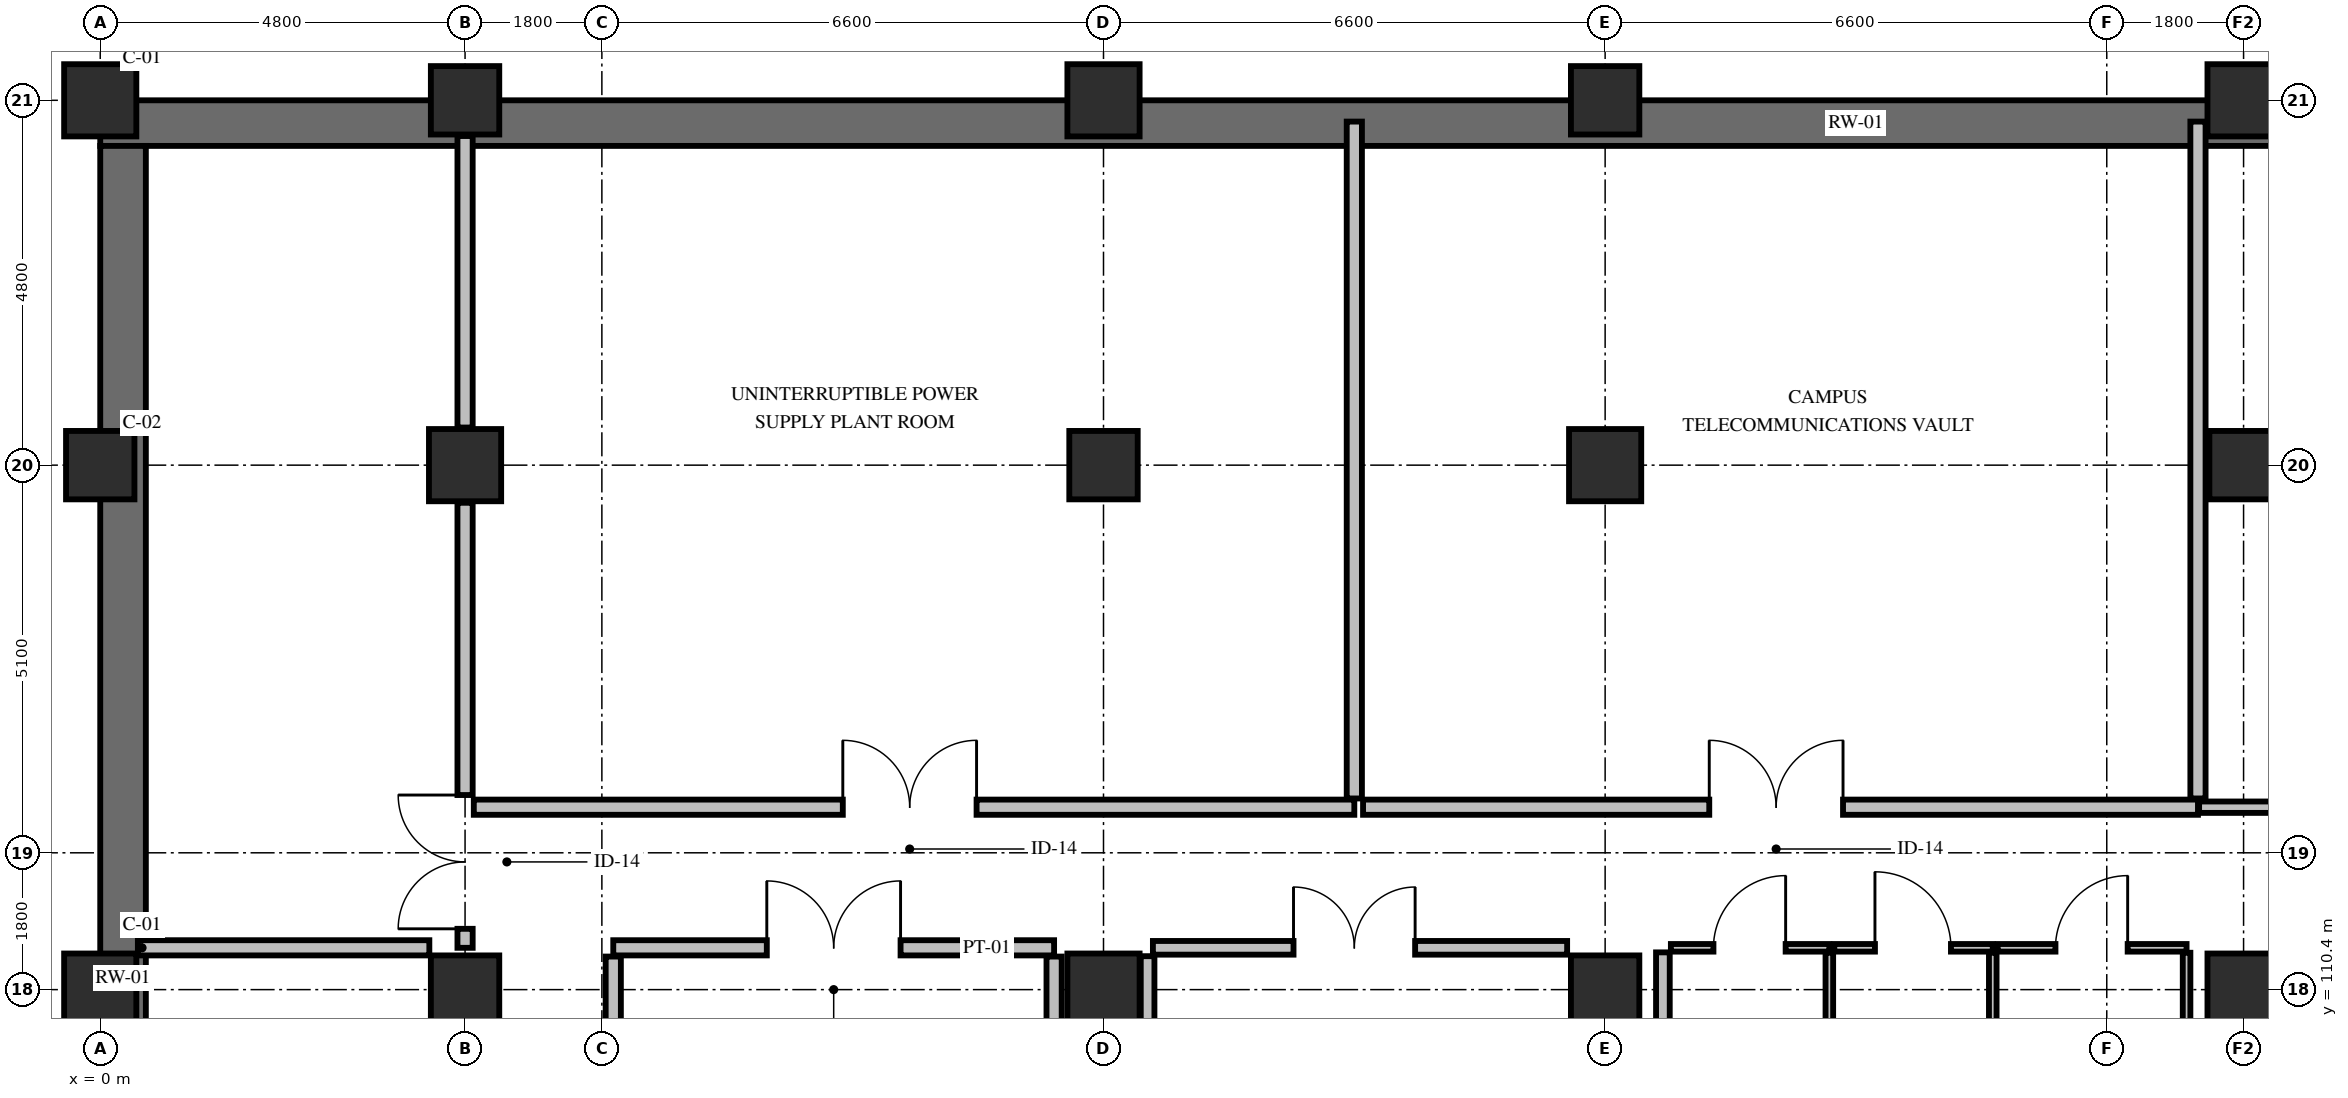
"""IFC4 building model, lengths in metres.
Left out: names, types, materials, properties, quantities, classifications, styles, units other than length and angle.
Written with IfcOpenShell. Run it as: python <this file> out.ifc"""

import sys

from ifc_helpers import new_model, si_unit, direction, frame, frame_2d, origin, origin_2d, place, context, subcontext, project, spatial, rectangle, extrude, element, fill, save


model = new_model("IFC4")
c1 = context("Model", 3, precision=1e-05, world=origin(), true_north=direction((0.0, 1.0)))
c2 = subcontext(c1, "Body", "Model", "MODEL_VIEW")
j1 = project(units=[si_unit("LENGTHUNIT", "METRE"), si_unit("PLANEANGLEUNIT", "RADIAN")], contexts=[c1])
p1 = place(None, origin())
s1 = spatial("IfcSite", under=j1, at=p1, CompositionType="ELEMENT")
p2 = place(p1, origin())
s2 = spatial("IfcBuilding", under=s1, at=p2, CompositionType="ELEMENT")
p3 = place(p2, frame((0.0, 0.0, -5.4)))
s3 = spatial("IfcBuildingStorey", under=s2, at=p3, CompositionType="ELEMENT", Elevation=-5.4)
p4 = place(p3, frame((0.0, 121.8, 0.0), z_axis=(0.0, 0.0, 1.0), x_axis=(1.0, 0.0, 0.0)))
e1 = element("IfcWall", 1, at=p4, inside=s3, PredefinedType="USERDEFINED", context=c2, shape_type="SweptSolid", body=[
    extrude(rectangle(XDim=46.2, YDim=0.6, at=frame_2d((23.1, 0.0))), origin(), (0.0, 0.0, 1.0), 4.96),
])
p5 = place(p3, frame((0.3, 99.6, 0.0), z_axis=(0.0, 0.0, 1.0), x_axis=(0.0, 1.0, 0.0)))
e2 = element("IfcWall", 2, at=p5, inside=s3, PredefinedType="USERDEFINED", context=c2, shape_type="SweptSolid", body=[
    extrude(rectangle(XDim=21.9, YDim=0.6, at=frame_2d((10.95, 0.0))), origin(), (0.0, 0.0, 1.0), 4.96),
])
p6 = place(p3, frame((0.0, 110.4, 0.0), z_axis=(0.0, 0.0, 1.0), x_axis=(1.0, 0.0, 0.0)))
e3 = element("IfcColumn", 3, at=p6, inside=s3, PredefinedType="COLUMN", context=c2, shape_type="SweptSolid", body=[
    extrude(rectangle(XDim=0.95, YDim=0.95, at=origin_2d()), origin(), (0.0, 0.0, 1.0), 5.4),
])
p7 = place(p3, frame((0.0, 117.3, 0.0), z_axis=(0.0, 0.0, 1.0), x_axis=(1.0, 0.0, 0.0)))
e4 = element("IfcColumn", 4, at=p7, inside=s3, PredefinedType="COLUMN", context=c2, shape_type="SweptSolid", body=[
    extrude(rectangle(XDim=0.9, YDim=0.9, at=origin_2d()), origin(), (0.0, 0.0, 1.0), 5.4),
])
p8 = place(p3, frame((0.0, 122.1, 0.0), z_axis=(0.0, 0.0, 1.0), x_axis=(1.0, 0.0, 0.0)))
e5 = element("IfcColumn", 5, at=p8, inside=s3, PredefinedType="COLUMN", context=c2, shape_type="SweptSolid", body=[
    extrude(rectangle(XDim=0.95, YDim=0.95, at=origin_2d()), origin(), (0.0, 0.0, 1.0), 5.4),
])
p9 = place(p3, frame((4.8, 110.4, 0.0), z_axis=(0.0, 0.0, 1.0), x_axis=(1.0, 0.0, 0.0)))
e6 = element("IfcColumn", 6, at=p9, inside=s3, PredefinedType="COLUMN", context=c2, shape_type="SweptSolid", body=[
    extrude(rectangle(XDim=0.9, YDim=0.9, at=origin_2d()), origin(), (0.0, 0.0, 1.0), 5.4),
])
p10 = place(p3, frame((4.8, 117.3, 0.0), z_axis=(0.0, 0.0, 1.0), x_axis=(1.0, 0.0, 0.0)))
e7 = element("IfcColumn", 7, at=p10, inside=s3, PredefinedType="COLUMN", context=c2, shape_type="SweptSolid", body=[
    extrude(rectangle(XDim=0.95, YDim=0.95, at=origin_2d()), origin(), (0.0, 0.0, 1.0), 5.4),
])
p11 = place(p3, frame((4.8, 122.1, 0.0), z_axis=(0.0, 0.0, 1.0), x_axis=(1.0, 0.0, 0.0)))
e8 = element("IfcColumn", 8, at=p11, inside=s3, PredefinedType="COLUMN", context=c2, shape_type="SweptSolid", body=[
    extrude(rectangle(XDim=0.9, YDim=0.9, at=origin_2d()), origin(), (0.0, 0.0, 1.0), 5.4),
])
p12 = place(p3, frame((13.2, 110.4, 0.0), z_axis=(0.0, 0.0, 1.0), x_axis=(1.0, 0.0, 0.0)))
e9 = element("IfcColumn", 9, at=p12, inside=s3, PredefinedType="COLUMN", context=c2, shape_type="SweptSolid", body=[
    extrude(rectangle(XDim=0.95, YDim=0.95, at=origin_2d()), origin(), (0.0, 0.0, 1.0), 5.4),
])
p13 = place(p3, frame((13.2, 117.3, 0.0), z_axis=(0.0, 0.0, 1.0), x_axis=(1.0, 0.0, 0.0)))
e10 = element("IfcColumn", 10, at=p13, inside=s3, PredefinedType="COLUMN", context=c2, shape_type="SweptSolid", body=[
    extrude(rectangle(XDim=0.9, YDim=0.9, at=origin_2d()), origin(), (0.0, 0.0, 1.0), 5.4),
])
p14 = place(p3, frame((13.2, 122.1, 0.0), z_axis=(0.0, 0.0, 1.0), x_axis=(1.0, 0.0, 0.0)))
e11 = element("IfcColumn", 11, at=p14, inside=s3, PredefinedType="COLUMN", context=c2, shape_type="SweptSolid", body=[
    extrude(rectangle(XDim=0.95, YDim=0.95, at=origin_2d()), origin(), (0.0, 0.0, 1.0), 5.4),
])
p15 = place(p3, frame((19.8, 110.4, 0.0), z_axis=(0.0, 0.0, 1.0), x_axis=(1.0, 0.0, 0.0)))
e12 = element("IfcColumn", 12, at=p15, inside=s3, PredefinedType="COLUMN", context=c2, shape_type="SweptSolid", body=[
    extrude(rectangle(XDim=0.9, YDim=0.9, at=origin_2d()), origin(), (0.0, 0.0, 1.0), 5.4),
])
p16 = place(p3, frame((19.8, 117.3, 0.0), z_axis=(0.0, 0.0, 1.0), x_axis=(1.0, 0.0, 0.0)))
e13 = element("IfcColumn", 13, at=p16, inside=s3, PredefinedType="COLUMN", context=c2, shape_type="SweptSolid", body=[
    extrude(rectangle(XDim=0.95, YDim=0.95, at=origin_2d()), origin(), (0.0, 0.0, 1.0), 5.4),
])
p17 = place(p3, frame((19.8, 122.1, 0.0), z_axis=(0.0, 0.0, 1.0), x_axis=(1.0, 0.0, 0.0)))
e14 = element("IfcColumn", 14, at=p17, inside=s3, PredefinedType="COLUMN", context=c2, shape_type="SweptSolid", body=[
    extrude(rectangle(XDim=0.9, YDim=0.9, at=origin_2d()), origin(), (0.0, 0.0, 1.0), 5.4),
])
p18 = place(p3, frame((28.2, 110.4, 0.0), z_axis=(0.0, 0.0, 1.0), x_axis=(1.0, 0.0, 0.0)))
e15 = element("IfcColumn", 15, at=p18, inside=s3, PredefinedType="COLUMN", context=c2, shape_type="SweptSolid", body=[
    extrude(rectangle(XDim=0.95, YDim=0.95, at=origin_2d()), origin(), (0.0, 0.0, 1.0), 5.4),
])
p19 = place(p3, frame((28.2, 117.3, 0.0), z_axis=(0.0, 0.0, 1.0), x_axis=(1.0, 0.0, 0.0)))
e16 = element("IfcColumn", 16, at=p19, inside=s3, PredefinedType="COLUMN", context=c2, shape_type="SweptSolid", body=[
    extrude(rectangle(XDim=0.9, YDim=0.9, at=origin_2d()), origin(), (0.0, 0.0, 1.0), 5.4),
])
p20 = place(p3, frame((28.2, 122.1, 0.0), z_axis=(0.0, 0.0, 1.0), x_axis=(1.0, 0.0, 0.0)))
e17 = element("IfcColumn", 17, at=p20, inside=s3, PredefinedType="COLUMN", context=c2, shape_type="SweptSolid", body=[
    extrude(rectangle(XDim=0.95, YDim=0.95, at=origin_2d()), origin(), (0.0, 0.0, 1.0), 5.4),
])
p21 = place(p3, frame((13.85, 110.95, 0.0), z_axis=(0.0, 0.0, 1.0), x_axis=(1.0, 0.0, 0.0)))
e18 = element("IfcWall", 18, at=p21, inside=s3, PredefinedType="PARTITIONING", context=c2, shape_type="SweptSolid", body=[
    extrude(rectangle(XDim=5.45, YDim=0.18, at=frame_2d((2.725, 0.0))), origin(), (0.0, 0.0, 1.0), 4.895),
])
p22 = place(p21, frame((1.85, 0.0, 0.0)))
e19 = element("IfcOpeningElement", 19, at=p22, cuts=e18, PredefinedType="OPENING", context=c2, shape_type="SweptSolid", body=[
    extrude(rectangle(XDim=1.6, YDim=2.25, at=frame_2d((0.8, 1.125))), frame((0.0, 0.105, 0.0), z_axis=(0.0, -1.0, 0.0), x_axis=(1.0, 0.0, 0.0)), (0.0, 0.0, 1.0), 0.21),
])
p23 = place(p3, frame((13.78, 107.23, 0.0), z_axis=(0.0, 0.0, 1.0), x_axis=(0.0, 1.0, 0.0)))
e20 = element("IfcWall", 20, at=p23, inside=s3, PredefinedType="PARTITIONING", context=c2, shape_type="SweptSolid", body=[
    extrude(rectangle(XDim=3.61, YDim=0.18, at=frame_2d((1.805, 0.0))), origin(), (0.0, 0.0, 1.0), 4.73),
])
p24 = place(p3, frame((20.56, 107.98, 0.0), z_axis=(0.0, 0.0, 1.0), x_axis=(0.0, 1.0, 0.0)))
e21 = element("IfcWall", 21, at=p24, inside=s3, PredefinedType="PARTITIONING", context=c2, shape_type="SweptSolid", body=[
    extrude(rectangle(XDim=2.91, YDim=0.18, at=frame_2d((1.455, 0.0))), origin(), (0.0, 0.0, 1.0), 4.43),
])
p25 = place(p3, frame((20.665, 110.95, 0.0), z_axis=(0.0, 0.0, 1.0), x_axis=(1.0, 0.0, 0.0)))
e22 = element("IfcWall", 22, at=p25, inside=s3, PredefinedType="PARTITIONING", context=c2, shape_type="SweptSolid", body=[
    extrude(rectangle(XDim=2.085, YDim=0.1, at=frame_2d((1.042, 0.0))), origin(), (0.0, 0.0, 1.0), 4.895),
])
p26 = place(p25, frame((0.56, 0.0, 0.0)))
e23 = element("IfcOpeningElement", 23, at=p26, cuts=e22, PredefinedType="OPENING", context=c2, shape_type="SweptSolid", body=[
    extrude(rectangle(XDim=0.95, YDim=2.15, at=frame_2d((0.475, 1.075))), frame((0.0, 0.065, 0.0), z_axis=(0.0, -1.0, 0.0), x_axis=(1.0, 0.0, 0.0)), (0.0, 0.0, 1.0), 0.13),
])
p27 = place(p3, frame((22.75, 107.98, 0.0), z_axis=(0.0, 0.0, 1.0), x_axis=(0.0, 1.0, 0.0)))
e24 = element("IfcWall", 24, at=p27, inside=s3, PredefinedType="PARTITIONING", context=c2, shape_type="SweptSolid", body=[
    extrude(rectangle(XDim=2.905, YDim=0.1, at=frame_2d((1.453, 0.0))), origin(), (0.0, 0.0, 1.0), 4.43),
])
p28 = place(p3, frame((22.815, 110.95, 0.0), z_axis=(0.0, 0.0, 1.0), x_axis=(1.0, 0.0, 0.0)))
e25 = element("IfcWall", 25, at=p28, inside=s3, PredefinedType="PARTITIONING", context=c2, shape_type="SweptSolid", body=[
    extrude(rectangle(XDim=2.085, YDim=0.1, at=frame_2d((1.042, 0.0))), origin(), (0.0, 0.0, 1.0), 4.96),
])
p29 = place(p28, frame((0.535, 0.0, 0.0)))
e26 = element("IfcOpeningElement", 26, at=p29, cuts=e25, PredefinedType="OPENING", context=c2, shape_type="SweptSolid", body=[
    extrude(rectangle(XDim=1.0, YDim=2.15, at=frame_2d((0.5, 1.075))), frame((0.0, 0.065, 0.0), z_axis=(0.0, -1.0, 0.0), x_axis=(1.0, 0.0, 0.0)), (0.0, 0.0, 1.0), 0.13),
])
p30 = place(p3, frame((24.9, 107.98, 0.0), z_axis=(0.0, 0.0, 1.0), x_axis=(0.0, 1.0, 0.0)))
e27 = element("IfcWall", 27, at=p30, inside=s3, PredefinedType="PARTITIONING", context=c2, shape_type="SweptSolid", body=[
    extrude(rectangle(XDim=2.905, YDim=0.1, at=frame_2d((1.453, 0.0))), origin(), (0.0, 0.0, 1.0), 4.43),
])
p31 = place(p3, frame((24.965, 110.95, 0.0), z_axis=(0.0, 0.0, 1.0), x_axis=(1.0, 0.0, 0.0)))
e28 = element("IfcWall", 28, at=p31, inside=s3, PredefinedType="PARTITIONING", context=c2, shape_type="SweptSolid", body=[
    extrude(rectangle(XDim=2.485, YDim=0.1, at=frame_2d((1.242, 0.0))), origin(), (0.0, 0.0, 1.0), 4.895),
])
p32 = place(p31, frame((0.76, 0.0, 0.0)))
e29 = element("IfcOpeningElement", 29, at=p32, cuts=e28, PredefinedType="OPENING", context=c2, shape_type="SweptSolid", body=[
    extrude(rectangle(XDim=0.95, YDim=2.15, at=frame_2d((0.475, 1.075))), frame((0.0, 0.065, 0.0), z_axis=(0.0, -1.0, 0.0), x_axis=(1.0, 0.0, 0.0)), (0.0, 0.0, 1.0), 0.13),
])
p33 = place(p3, frame((27.45, 107.98, 0.0), z_axis=(0.0, 0.0, 1.0), x_axis=(0.0, 1.0, 0.0)))
e30 = element("IfcWall", 30, at=p33, inside=s3, PredefinedType="PARTITIONING", context=c2, shape_type="SweptSolid", body=[
    extrude(rectangle(XDim=2.905, YDim=0.1, at=frame_2d((1.453, 0.0))), origin(), (0.0, 0.0, 1.0), 4.43),
])
p34 = place(p3, frame((6.75, 110.95, 0.0), z_axis=(0.0, 0.0, 1.0), x_axis=(1.0, 0.0, 0.0)))
e31 = element("IfcWall", 31, at=p34, inside=s3, PredefinedType="PARTITIONING", context=c2, shape_type="SweptSolid", body=[
    extrude(rectangle(XDim=5.8, YDim=0.2, at=frame_2d((2.9, 0.0))), origin(), (0.0, 0.0, 1.0), 4.895),
])
p35 = place(p34, frame((2.02, 0.0, 0.0)))
e32 = element("IfcOpeningElement", 32, at=p35, cuts=e31, PredefinedType="OPENING", context=c2, shape_type="SweptSolid", body=[
    extrude(rectangle(XDim=1.76, YDim=2.35, at=frame_2d((0.88, 1.175))), frame((0.0, 0.115, 0.0), z_axis=(0.0, -1.0, 0.0), x_axis=(1.0, 0.0, 0.0)), (0.0, 0.0, 1.0), 0.23),
])
for number, where, z_axis, x_axis in (
    (33, (6.75, 104.615, 0.0), (0.0, 0.0, 1.0), (0.0, 1.0, 0.0)),
    (34, (12.55, 104.615, 0.0), (0.0, 0.0, 1.0), (0.0, 1.0, 0.0)),
):
    element("IfcWall", number, at=place(p3, frame(where, z_axis=z_axis, x_axis=x_axis)), inside=s3, PredefinedType="PARTITIONING", context=c2, shape_type="SweptSolid", body=[
        extrude(rectangle(XDim=6.22, YDim=0.2, at=frame_2d((3.11, 0.0))), origin(), (0.0, 0.0, 1.0), 4.43),
    ])
p36 = place(p3, frame((0.495, 110.95, 0.0), z_axis=(0.0, 0.0, 1.0), x_axis=(1.0, 0.0, 0.0)))
e35 = element("IfcWall", 35, at=p36, inside=s3, PredefinedType="PARTITIONING", context=c2, shape_type="SweptSolid", body=[
    extrude(rectangle(XDim=3.835, YDim=0.2, at=frame_2d((1.917, 0.0))), origin(), (0.0, 0.0, 1.0), 4.895),
])
p37 = place(p3, frame((4.8, 110.95, 0.0), z_axis=(0.0, 0.0, 1.0), x_axis=(0.0, 1.0, 0.0)))
e36 = element("IfcWall", 36, at=p37, inside=s3, PredefinedType="PARTITIONING", context=c2, shape_type="SweptSolid", body=[
    extrude(rectangle(XDim=5.855, YDim=0.2, at=frame_2d((2.927, 0.0))), origin(), (0.0, 0.0, 1.0), 4.73),
])
p38 = place(p37, frame((0.25, 0.0, 0.0)))
e37 = element("IfcOpeningElement", 37, at=p38, cuts=e36, PredefinedType="OPENING", context=c2, shape_type="SweptSolid", body=[
    extrude(rectangle(XDim=1.76, YDim=2.35, at=frame_2d((0.88, 1.175))), frame((0.0, 0.115, 0.0), z_axis=(0.0, -1.0, 0.0), x_axis=(1.0, 0.0, 0.0)), (0.0, 0.0, 1.0), 0.23),
])
p39 = place(p3, frame((4.8, 117.795, 0.0), z_axis=(0.0, 0.0, 1.0), x_axis=(0.0, 1.0, 0.0)))
e38 = element("IfcWall", 38, at=p39, inside=s3, PredefinedType="PARTITIONING", context=c2, shape_type="SweptSolid", body=[
    extrude(rectangle(XDim=3.835, YDim=0.2, at=frame_2d((1.917, 0.0))), origin(), (0.0, 0.0, 1.0), 4.73),
])
p40 = place(p3, frame((4.915, 112.8, 0.0), z_axis=(0.0, 0.0, 1.0), x_axis=(1.0, 0.0, 0.0)))
e39 = element("IfcWall", 39, at=p40, inside=s3, PredefinedType="PARTITIONING", context=c2, shape_type="SweptSolid", body=[
    extrude(rectangle(XDim=11.585, YDim=0.2, at=frame_2d((5.792, 0.0))), origin(), (0.0, 0.0, 1.0), 4.73),
])
p41 = place(p40, frame((4.855, 0.0, 0.0)))
e40 = element("IfcOpeningElement", 40, at=p41, cuts=e39, PredefinedType="OPENING", context=c2, shape_type="SweptSolid", body=[
    extrude(rectangle(XDim=1.76, YDim=2.35, at=frame_2d((0.88, 1.175))), frame((0.0, 0.115, 0.0), z_axis=(0.0, -1.0, 0.0), x_axis=(1.0, 0.0, 0.0)), (0.0, 0.0, 1.0), 0.23),
])
p42 = place(p3, frame((16.5, 112.915, 0.0), z_axis=(0.0, 0.0, 1.0), x_axis=(0.0, 1.0, 0.0)))
e41 = element("IfcWall", 41, at=p42, inside=s3, PredefinedType="PARTITIONING", context=c2, shape_type="SweptSolid", body=[
    extrude(rectangle(XDim=8.905, YDim=0.2, at=frame_2d((4.453, 0.0))), origin(), (0.0, 0.0, 1.0), 4.73),
])
p43 = place(p3, frame((16.615, 112.8, 0.0), z_axis=(0.0, 0.0, 1.0), x_axis=(1.0, 0.0, 0.0)))
e42 = element("IfcWall", 42, at=p43, inside=s3, PredefinedType="PARTITIONING", context=c2, shape_type="SweptSolid", body=[
    extrude(rectangle(XDim=10.985, YDim=0.2, at=frame_2d((5.493, 0.0))), origin(), (0.0, 0.0, 1.0), 4.73),
])
p44 = place(p43, frame((4.555, 0.0, 0.0)))
e43 = element("IfcOpeningElement", 43, at=p44, cuts=e42, PredefinedType="OPENING", context=c2, shape_type="SweptSolid", body=[
    extrude(rectangle(XDim=1.76, YDim=2.35, at=frame_2d((0.88, 1.175))), frame((0.0, 0.115, 0.0), z_axis=(0.0, -1.0, 0.0), x_axis=(1.0, 0.0, 0.0)), (0.0, 0.0, 1.0), 0.23),
])
p45 = place(p3, frame((27.6, 112.915, 0.0), z_axis=(0.0, 0.0, 1.0), x_axis=(0.0, 1.0, 0.0)))
e44 = element("IfcWall", 44, at=p45, inside=s3, PredefinedType="PARTITIONING", context=c2, shape_type="SweptSolid", body=[
    extrude(rectangle(XDim=8.905, YDim=0.2, at=frame_2d((4.453, 0.0))), origin(), (0.0, 0.0, 1.0), 4.43),
])
p46 = place(p3, frame((27.615, 112.8, 0.0), z_axis=(0.0, 0.0, 1.0), x_axis=(1.0, 0.0, 0.0)))
e45 = element("IfcWall", 45, at=p46, inside=s3, PredefinedType="PARTITIONING", context=c2, shape_type="SweptSolid", body=[
    extrude(rectangle(XDim=18.305, YDim=0.15, at=frame_2d((9.152, 0.0))), origin(), (0.0, 0.0, 1.0), 4.73),
])
p47 = place(p46, frame((8.475, 0.0, 0.0)))
e46 = element("IfcOpeningElement", 46, at=p47, cuts=e45, PredefinedType="OPENING", context=c2, shape_type="SweptSolid", body=[
    extrude(rectangle(XDim=1.34, YDim=2.2, at=frame_2d((0.67, 1.1))), frame((0.0, 0.09, 0.0), z_axis=(0.0, -1.0, 0.0), x_axis=(1.0, 0.0, 0.0)), (0.0, 0.0, 1.0), 0.18),
])
p48 = place(p22, origin())
e47 = element("IfcDoor", 47, at=p48, inside=s3, OperationType="DOUBLE_DOOR_SINGLE_SWING", PredefinedType="DOOR", context=c2, shape_type="SweptSolid", body=[
    extrude(rectangle(XDim=1.6, YDim=2.25, at=frame_2d((0.8, 1.125))), frame((0.0, 0.025, 0.0), z_axis=(0.0, -1.0, 0.0), x_axis=(1.0, 0.0, 0.0)), (0.0, 0.0, 1.0), 0.05),
])
fill(e19, e47)
p49 = place(p26, origin())
e48 = element("IfcDoor", 48, at=p49, inside=s3, OperationType="SINGLE_SWING_RIGHT", PredefinedType="DOOR", context=c2, shape_type="SweptSolid", body=[
    extrude(rectangle(XDim=0.95, YDim=2.15, at=frame_2d((0.475, 1.075))), frame((0.0, 0.025, 0.0), z_axis=(0.0, -1.0, 0.0), x_axis=(1.0, 0.0, 0.0)), (0.0, 0.0, 1.0), 0.05),
])
fill(e23, e48)
p50 = place(p29, origin())
e49 = element("IfcDoor", 49, at=p50, inside=s3, OperationType="SINGLE_SWING_LEFT", PredefinedType="DOOR", context=c2, shape_type="SweptSolid", body=[
    extrude(rectangle(XDim=1.0, YDim=2.15, at=frame_2d((0.5, 1.075))), frame((0.0, 0.025, 0.0), z_axis=(0.0, -1.0, 0.0), x_axis=(1.0, 0.0, 0.0)), (0.0, 0.0, 1.0), 0.05),
])
fill(e26, e49)
p51 = place(p32, origin())
e50 = element("IfcDoor", 50, at=p51, inside=s3, OperationType="SINGLE_SWING_RIGHT", PredefinedType="DOOR", context=c2, shape_type="SweptSolid", body=[
    extrude(rectangle(XDim=0.95, YDim=2.15, at=frame_2d((0.475, 1.075))), frame((0.0, 0.025, 0.0), z_axis=(0.0, -1.0, 0.0), x_axis=(1.0, 0.0, 0.0)), (0.0, 0.0, 1.0), 0.05),
])
fill(e29, e50)
p52 = place(p35, origin())
e51 = element("IfcDoor", 51, at=p52, inside=s3, OperationType="DOUBLE_DOOR_SINGLE_SWING", PredefinedType="DOOR", context=c2, shape_type="SweptSolid", body=[
    extrude(rectangle(XDim=1.76, YDim=2.35, at=frame_2d((0.88, 1.175))), frame((0.0, 0.025, 0.0), z_axis=(0.0, -1.0, 0.0), x_axis=(1.0, 0.0, 0.0)), (0.0, 0.0, 1.0), 0.05),
])
fill(e32, e51)
p53 = place(p38, origin())
e52 = element("IfcDoor", 52, at=p53, inside=s3, OperationType="DOUBLE_DOOR_SINGLE_SWING", PredefinedType="DOOR", context=c2, shape_type="SweptSolid", body=[
    extrude(rectangle(XDim=1.76, YDim=2.35, at=frame_2d((0.88, 1.175))), frame((0.0, 0.025, 0.0), z_axis=(0.0, -1.0, 0.0), x_axis=(1.0, 0.0, 0.0)), (0.0, 0.0, 1.0), 0.05),
])
fill(e37, e52)
p54 = place(p41, origin())
e53 = element("IfcDoor", 53, at=p54, inside=s3, OperationType="DOUBLE_DOOR_SINGLE_SWING", PredefinedType="DOOR", context=c2, shape_type="SweptSolid", body=[
    extrude(rectangle(XDim=1.76, YDim=2.35, at=frame_2d((0.88, 1.175))), frame((0.0, 0.025, 0.0), z_axis=(0.0, -1.0, 0.0), x_axis=(1.0, 0.0, 0.0)), (0.0, 0.0, 1.0), 0.05),
])
fill(e40, e53)
p55 = place(p44, origin())
e54 = element("IfcDoor", 54, at=p55, inside=s3, OperationType="DOUBLE_DOOR_SINGLE_SWING", PredefinedType="DOOR", context=c2, shape_type="SweptSolid", body=[
    extrude(rectangle(XDim=1.76, YDim=2.35, at=frame_2d((0.88, 1.175))), frame((0.0, 0.025, 0.0), z_axis=(0.0, -1.0, 0.0), x_axis=(1.0, 0.0, 0.0)), (0.0, 0.0, 1.0), 0.05),
])
fill(e43, e54)
save(model, sys.argv[1])
